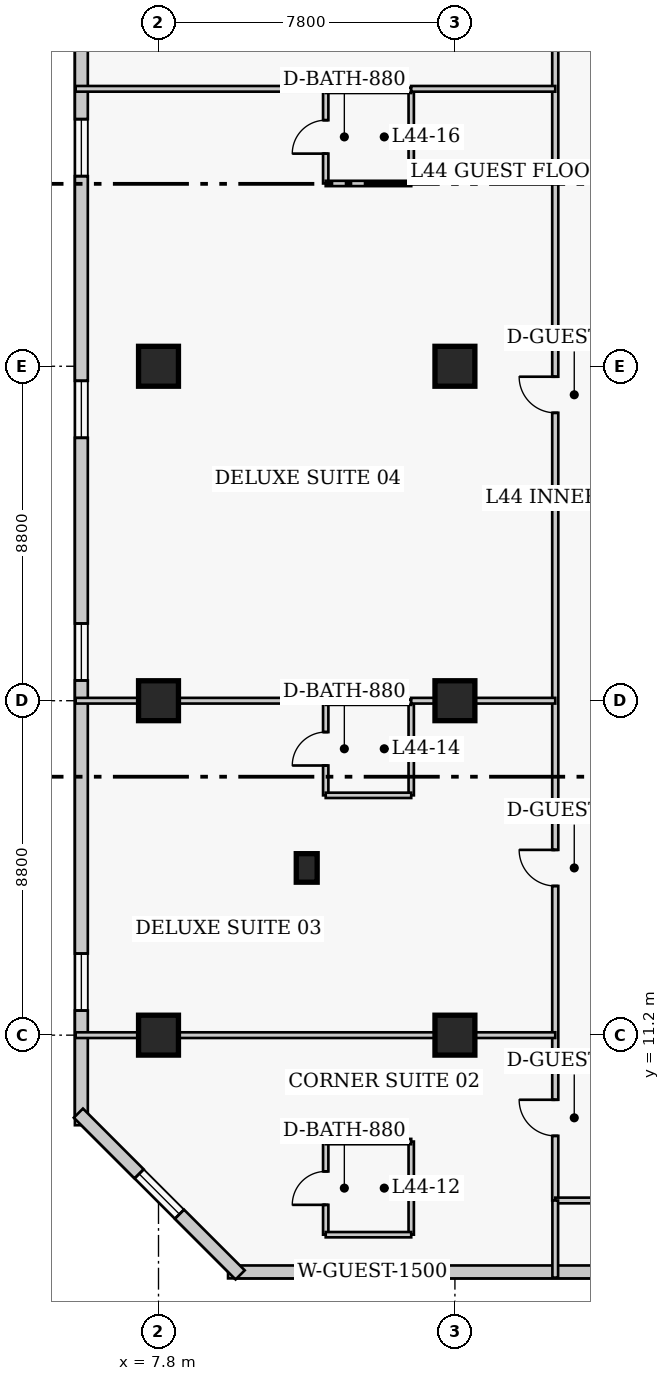
"""IFC4 building model, lengths in metres.
Left out: names, types, materials, properties, quantities, classifications, styles, units other than length and angle.
Written with IfcOpenShell. Run it as: python <this file> out.ifc"""

import sys

from ifc_helpers import new_model, si_unit, direction, frame, frame_2d, origin, origin_2d, place, context, subcontext, project, spatial, rectangle, extrude, element, fill, save


model = new_model("IFC4")
c1 = context("Model", 3, precision=1e-05, world=origin(), true_north=direction((0.0, 1.0)))
c2 = subcontext(c1, "Body", "Model", "MODEL_VIEW")
j1 = project(units=[si_unit("LENGTHUNIT", "METRE"), si_unit("PLANEANGLEUNIT", "RADIAN")], contexts=[c1])
p1 = place(None, origin())
s1 = spatial("IfcSite", under=j1, at=p1, CompositionType="ELEMENT")
p2 = place(p1, origin())
s2 = spatial("IfcBuilding", under=s1, at=p2, CompositionType="ELEMENT")
p3 = place(p2, frame((0.0, 0.0, 176.4)))
s3 = spatial("IfcBuildingStorey", under=s2, at=p3, CompositionType="ELEMENT", Elevation=176.4)
for number, where, z_axis, x_axis in (
    (1, (7.8, 11.2, 0.0), (0.0, 0.0, 1.0), (1.0, 0.0, 0.0)),
    (2, (7.8, 20.0, 0.0), (0.0, 0.0, 1.0), (1.0, 0.0, 0.0)),
    (3, (7.8, 28.8, 0.0), (0.0, 0.0, 1.0), (1.0, 0.0, 0.0)),
    (4, (15.6, 11.2, 0.0), (0.0, 0.0, 1.0), (1.0, 0.0, 0.0)),
    (5, (15.6, 20.0, 0.0), (0.0, 0.0, 1.0), (1.0, 0.0, 0.0)),
    (6, (15.6, 28.8, 0.0), (0.0, 0.0, 1.0), (1.0, 0.0, 0.0)),
):
    element("IfcColumn", number, at=place(p3, frame(where, z_axis=z_axis, x_axis=x_axis)), inside=s3, PredefinedType="COLUMN", context=c2, shape_type="SweptSolid", body=[
        extrude(rectangle(XDim=1.05, YDim=1.05, at=origin_2d()), origin(), (0.0, 0.0, 1.0), 3.8),
    ])
p4 = place(p3, frame((11.7, 15.6, 0.0), z_axis=(0.0, 0.0, 1.0), x_axis=(1.0, 0.0, 0.0)))
e7 = element("IfcColumn", 7, at=p4, inside=s3, PredefinedType="PILASTER", context=c2, shape_type="SweptSolid", body=[
    extrude(rectangle(XDim=0.55, YDim=0.75, at=origin_2d()), origin(), (0.0, 0.0, 1.0), 3.8),
])
p5 = place(p3, frame((9.63, 4.97, 0.0), z_axis=(0.0, 0.0, 1.0), x_axis=(1.0, 0.0, 0.0)))
e8 = element("IfcWall", 8, at=p5, inside=s3, PredefinedType="SOLIDWALL", context=c2, shape_type="SweptSolid", body=[
    extrude(rectangle(XDim=26.69, YDim=0.34, at=frame_2d((13.345, 0.0))), origin(), (0.0, 0.0, 1.0), 3.55),
])
p6 = place(p5, frame((3.048, 0.0, 0.85)))
e9 = element("IfcOpeningElement", 9, at=p6, cuts=e8, PredefinedType="OPENING", context=c2, shape_type="SweptSolid", body=[
    extrude(rectangle(XDim=1.5, YDim=1.75, at=frame_2d((0.75, 0.875))), frame((0.0, 0.18, 0.0), z_axis=(0.0, -1.0, 0.0), x_axis=(1.0, 0.0, 0.0)), (0.0, 0.0, 1.0), 0.36),
])
p7 = place(p5, frame((22.642, 0.0, 0.85)))
e10 = element("IfcOpeningElement", 10, at=p7, cuts=e8, PredefinedType="OPENING", context=c2, shape_type="SweptSolid", body=[
    extrude(rectangle(XDim=1.5, YDim=1.75, at=frame_2d((0.75, 0.875))), frame((0.0, 0.18, 0.0), z_axis=(0.0, -1.0, 0.0), x_axis=(1.0, 0.0, 0.0)), (0.0, 0.0, 1.0), 0.36),
])
p8 = place(p3, frame((5.77, 38.97, 0.0), z_axis=(0.0, 0.0, 1.0), x_axis=(0.0, -1.0, 0.0)))
e11 = element("IfcWall", 11, at=p8, inside=s3, PredefinedType="SOLIDWALL", context=c2, shape_type="SweptSolid", body=[
    extrude(rectangle(XDim=30.14, YDim=0.34, at=frame_2d((15.07, 0.0))), origin(), (0.0, 0.0, 1.0), 3.55),
])
p9 = place(p8, frame((3.667, 0.0, 0.85)))
e12 = element("IfcOpeningElement", 12, at=p9, cuts=e11, PredefinedType="OPENING", context=c2, shape_type="SweptSolid", body=[
    extrude(rectangle(XDim=1.5, YDim=1.75, at=frame_2d((0.75, 0.875))), frame((0.0, 0.18, 0.0), z_axis=(0.0, -1.0, 0.0), x_axis=(1.0, 0.0, 0.0)), (0.0, 0.0, 1.0), 0.36),
])
p10 = place(p8, frame((10.552, 0.0, 0.85)))
e13 = element("IfcOpeningElement", 13, at=p10, cuts=e11, PredefinedType="OPENING", context=c2, shape_type="SweptSolid", body=[
    extrude(rectangle(XDim=1.5, YDim=1.75, at=frame_2d((0.75, 0.875))), frame((0.0, 0.18, 0.0), z_axis=(0.0, -1.0, 0.0), x_axis=(1.0, 0.0, 0.0)), (0.0, 0.0, 1.0), 0.36),
])
p11 = place(p8, frame((16.938, 0.0, 0.85)))
e14 = element("IfcOpeningElement", 14, at=p11, cuts=e11, PredefinedType="OPENING", context=c2, shape_type="SweptSolid", body=[
    extrude(rectangle(XDim=1.5, YDim=1.75, at=frame_2d((0.75, 0.875))), frame((0.0, 0.18, 0.0), z_axis=(0.0, -1.0, 0.0), x_axis=(1.0, 0.0, 0.0)), (0.0, 0.0, 1.0), 0.36),
])
p12 = place(p8, frame((25.623, 0.0, 0.85)))
e15 = element("IfcOpeningElement", 15, at=p12, cuts=e11, PredefinedType="OPENING", context=c2, shape_type="SweptSolid", body=[
    extrude(rectangle(XDim=1.5, YDim=1.75, at=frame_2d((0.75, 0.875))), frame((0.0, 0.18, 0.0), z_axis=(0.0, -1.0, 0.0), x_axis=(1.0, 0.0, 0.0)), (0.0, 0.0, 1.0), 0.36),
])
p13 = place(p3, frame((5.692, 9.148, 0.0), z_axis=(0.0, 0.0, 1.0), x_axis=(0.707106781187, -0.707106781187, 0.0)))
e16 = element("IfcWall", 16, at=p13, inside=s3, PredefinedType="SOLIDWALL", context=c2, shape_type="SweptSolid", body=[
    extrude(rectangle(XDim=6.02, YDim=0.34, at=frame_2d((3.01, 0.0))), origin(), (0.0, 0.0, 1.0), 3.55),
])
p14 = place(p13, frame((2.26, 0.0, 0.85)))
e17 = element("IfcOpeningElement", 17, at=p14, cuts=e16, PredefinedType="OPENING", context=c2, shape_type="SweptSolid", body=[
    extrude(rectangle(XDim=1.5, YDim=1.75, at=frame_2d((0.75, 0.875))), frame((0.0, 0.18, 0.0), z_axis=(0.0, -1.0, 0.0), x_axis=(1.0, 0.0, 0.0)), (0.0, 0.0, 1.0), 0.36),
])
p15 = place(p3, frame((18.24, 6.85, 0.0), z_axis=(0.0, 0.0, 1.0), x_axis=(0.0, 1.0, 0.0)))
e18 = element("IfcWall", 18, at=p15, inside=s3, PredefinedType="PARTITIONING", context=c2, shape_type="SweptSolid", body=[
    extrude(rectangle(XDim=33.8, YDim=0.16, at=frame_2d((16.9, 0.0))), origin(), (0.0, 0.0, 1.0), 3.55),
])
p16 = place(p15, frame((1.7, 0.0, 0.0)))
e19 = element("IfcOpeningElement", 19, at=p16, cuts=e18, PredefinedType="OPENING", context=c2, shape_type="SweptSolid", body=[
    extrude(rectangle(XDim=0.95, YDim=2.1, at=frame_2d((0.475, 1.05))), frame((0.0, 0.09, 0.0), z_axis=(0.0, -1.0, 0.0), x_axis=(1.0, 0.0, 0.0)), (0.0, 0.0, 1.0), 0.18),
])
p17 = place(p15, frame((8.275, 0.0, 0.0)))
e20 = element("IfcOpeningElement", 20, at=p17, cuts=e18, PredefinedType="OPENING", context=c2, shape_type="SweptSolid", body=[
    extrude(rectangle(XDim=0.95, YDim=2.1, at=frame_2d((0.475, 1.05))), frame((0.0, 0.09, 0.0), z_axis=(0.0, -1.0, 0.0), x_axis=(1.0, 0.0, 0.0)), (0.0, 0.0, 1.0), 0.18),
])
p18 = place(p15, frame((20.725, 0.0, 0.0)))
e21 = element("IfcOpeningElement", 21, at=p18, cuts=e18, PredefinedType="OPENING", context=c2, shape_type="SweptSolid", body=[
    extrude(rectangle(XDim=0.95, YDim=2.1, at=frame_2d((0.475, 1.05))), frame((0.0, 0.09, 0.0), z_axis=(0.0, -1.0, 0.0), x_axis=(1.0, 0.0, 0.0)), (0.0, 0.0, 1.0), 0.18),
])
p19 = place(p15, frame((31.08, 0.0, 0.0)))
e22 = element("IfcOpeningElement", 22, at=p19, cuts=e18, PredefinedType="OPENING", context=c2, shape_type="SweptSolid", body=[
    extrude(rectangle(XDim=1.0, YDim=2.15, at=frame_2d((0.5, 1.075))), frame((0.0, 0.09, 0.0), z_axis=(0.0, -1.0, 0.0), x_axis=(1.0, 0.0, 0.0)), (0.0, 0.0, 1.0), 0.18),
])
p20 = place(p3, frame((18.24, 6.85, 0.0), z_axis=(0.0, 0.0, 1.0), x_axis=(1.0, 0.0, 0.0)))
e23 = element("IfcWall", 23, at=p20, inside=s3, PredefinedType="PARTITIONING", context=c2, shape_type="SweptSolid", body=[
    extrude(rectangle(XDim=2.22, YDim=0.15, at=frame_2d((1.11, 0.0))), origin(), (0.0, 0.0, 1.0), 3.55),
])
p21 = place(p3, frame((18.24, 4.82, 0.0), z_axis=(0.0, 0.0, 1.0), x_axis=(0.0, 1.0, 0.0)))
e24 = element("IfcWall", 24, at=p21, inside=s3, PredefinedType="PARTITIONING", context=c2, shape_type="SweptSolid", body=[
    extrude(rectangle(XDim=2.03, YDim=0.15, at=frame_2d((1.015, 0.0))), origin(), (0.0, 0.0, 1.0), 3.55),
])
p22 = place(p3, frame((12.2, 5.95, 0.0), z_axis=(0.0, 0.0, 1.0), x_axis=(0.0, 1.0, 0.0)))
e25 = element("IfcWall", 25, at=p22, inside=s3, PredefinedType="PLUMBINGWALL", context=c2, shape_type="SweptSolid", body=[
    extrude(rectangle(XDim=2.45, YDim=0.14, at=frame_2d((1.225, 0.0))), origin(), (0.0, 0.0, 1.0), 3.55),
])
p23 = place(p22, frame((0.785, 0.0, 0.0)))
e26 = element("IfcOpeningElement", 26, at=p23, cuts=e25, PredefinedType="OPENING", context=c2, shape_type="SweptSolid", body=[
    extrude(rectangle(XDim=0.88, YDim=2.05, at=frame_2d((0.44, 1.025))), frame((0.0, 0.08, 0.0), z_axis=(0.0, -1.0, 0.0), x_axis=(1.0, 0.0, 0.0)), (0.0, 0.0, 1.0), 0.16),
])
p24 = place(p3, frame((14.45, 5.95, 0.0), z_axis=(0.0, 0.0, 1.0), x_axis=(0.0, 1.0, 0.0)))
e27 = element("IfcWall", 27, at=p24, inside=s3, PredefinedType="PLUMBINGWALL", context=c2, shape_type="SweptSolid", body=[
    extrude(rectangle(XDim=2.45, YDim=0.14, at=frame_2d((1.225, 0.0))), origin(), (0.0, 0.0, 1.0), 3.55),
])
for number, where, z_axis, x_axis in (
    (28, (12.2, 5.95, 0.0), (0.0, 0.0, 1.0), (1.0, 0.0, 0.0)),
    (29, (12.2, 8.4, 0.0), (0.0, 0.0, 1.0), (1.0, 0.0, 0.0)),
):
    element("IfcWall", number, at=place(p3, frame(where, z_axis=z_axis, x_axis=x_axis)), inside=s3, PredefinedType="PLUMBINGWALL", context=c2, shape_type="SweptSolid", body=[
        extrude(rectangle(XDim=2.25, YDim=0.14, at=frame_2d((1.125, 0.0))), origin(), (0.0, 0.0, 1.0), 3.55),
    ])
p25 = place(p3, frame((5.62, 11.2, 0.0), z_axis=(0.0, 0.0, 1.0), x_axis=(1.0, 0.0, 0.0)))
e30 = element("IfcWall", 30, at=p25, inside=s3, PredefinedType="PARTITIONING", context=c2, shape_type="SweptSolid", body=[
    extrude(rectangle(XDim=12.62, YDim=0.15, at=frame_2d((6.31, 0.0))), origin(), (0.0, 0.0, 1.0), 2.778),
])
p26 = place(p3, frame((12.2, 17.51, 0.0), z_axis=(0.0, 0.0, 1.0), x_axis=(0.0, 1.0, 0.0)))
e31 = element("IfcWall", 31, at=p26, inside=s3, PredefinedType="PLUMBINGWALL", context=c2, shape_type="SweptSolid", body=[
    extrude(rectangle(XDim=2.45, YDim=0.14, at=frame_2d((1.225, 0.0))), origin(), (0.0, 0.0, 1.0), 3.55),
])
p27 = place(p26, frame((0.785, 0.0, 0.0)))
e32 = element("IfcOpeningElement", 32, at=p27, cuts=e31, PredefinedType="OPENING", context=c2, shape_type="SweptSolid", body=[
    extrude(rectangle(XDim=0.88, YDim=2.05, at=frame_2d((0.44, 1.025))), frame((0.0, 0.08, 0.0), z_axis=(0.0, -1.0, 0.0), x_axis=(1.0, 0.0, 0.0)), (0.0, 0.0, 1.0), 0.16),
])
p28 = place(p3, frame((14.45, 17.51, 0.0), z_axis=(0.0, 0.0, 1.0), x_axis=(0.0, 1.0, 0.0)))
e33 = element("IfcWall", 33, at=p28, inside=s3, PredefinedType="PLUMBINGWALL", context=c2, shape_type="SweptSolid", body=[
    extrude(rectangle(XDim=2.45, YDim=0.14, at=frame_2d((1.225, 0.0))), origin(), (0.0, 0.0, 1.0), 3.55),
])
p29 = place(p3, frame((12.2, 17.51, 0.0), z_axis=(0.0, 0.0, 1.0), x_axis=(1.0, 0.0, 0.0)))
e34 = element("IfcWall", 34, at=p29, inside=s3, PredefinedType="PLUMBINGWALL", context=c2, shape_type="SweptSolid", body=[
    extrude(rectangle(XDim=2.25, YDim=0.14, at=frame_2d((1.125, 0.0))), origin(), (0.0, 0.0, 1.0), 3.55),
])
p30 = place(p3, frame((12.2, 19.96, 0.0), z_axis=(0.0, 0.0, 1.0), x_axis=(1.0, 0.0, 0.0)))
e35 = element("IfcWall", 35, at=p30, inside=s3, PredefinedType="PLUMBINGWALL", context=c2, shape_type="SweptSolid", body=[
    extrude(rectangle(XDim=2.25, YDim=0.14, at=frame_2d((1.125, 0.0))), origin(), (0.0, 0.0, 1.0), 2.9),
])
p31 = place(p3, frame((5.62, 20.0, 0.0), z_axis=(0.0, 0.0, 1.0), x_axis=(1.0, 0.0, 0.0)))
e36 = element("IfcWall", 36, at=p31, inside=s3, PredefinedType="PARTITIONING", context=c2, shape_type="SweptSolid", body=[
    extrude(rectangle(XDim=6.58, YDim=0.15, at=frame_2d((3.29, 0.0))), origin(), (0.0, 0.0, 1.0), 2.778),
])
p32 = place(p3, frame((14.45, 20.0, 0.0), z_axis=(0.0, 0.0, 1.0), x_axis=(1.0, 0.0, 0.0)))
e37 = element("IfcWall", 37, at=p32, inside=s3, PredefinedType="PARTITIONING", context=c2, shape_type="SweptSolid", body=[
    extrude(rectangle(XDim=3.79, YDim=0.15, at=frame_2d((1.895, 0.0))), origin(), (0.0, 0.0, 1.0), 2.778),
])
p33 = place(p3, frame((12.2, 33.61, 0.0), z_axis=(0.0, 0.0, 1.0), x_axis=(0.0, 1.0, 0.0)))
e38 = element("IfcWall", 38, at=p33, inside=s3, PredefinedType="PLUMBINGWALL", context=c2, shape_type="SweptSolid", body=[
    extrude(rectangle(XDim=2.45, YDim=0.14, at=frame_2d((1.225, 0.0))), origin(), (0.0, 0.0, 1.0), 3.55),
])
p34 = place(p33, frame((0.785, 0.0, 0.0)))
e39 = element("IfcOpeningElement", 39, at=p34, cuts=e38, PredefinedType="OPENING", context=c2, shape_type="SweptSolid", body=[
    extrude(rectangle(XDim=0.88, YDim=2.05, at=frame_2d((0.44, 1.025))), frame((0.0, 0.08, 0.0), z_axis=(0.0, -1.0, 0.0), x_axis=(1.0, 0.0, 0.0)), (0.0, 0.0, 1.0), 0.16),
])
p35 = place(p3, frame((14.45, 33.61, 0.0), z_axis=(0.0, 0.0, 1.0), x_axis=(0.0, 1.0, 0.0)))
e40 = element("IfcWall", 40, at=p35, inside=s3, PredefinedType="PLUMBINGWALL", context=c2, shape_type="SweptSolid", body=[
    extrude(rectangle(XDim=2.45, YDim=0.14, at=frame_2d((1.225, 0.0))), origin(), (0.0, 0.0, 1.0), 3.55),
])
for number, where, z_axis, x_axis in (
    (41, (12.2, 33.61, 0.0), (0.0, 0.0, 1.0), (1.0, 0.0, 0.0)),
    (42, (12.2, 36.06, 0.0), (0.0, 0.0, 1.0), (1.0, 0.0, 0.0)),
):
    element("IfcWall", number, at=place(p3, frame(where, z_axis=z_axis, x_axis=x_axis)), inside=s3, PredefinedType="PLUMBINGWALL", context=c2, shape_type="SweptSolid", body=[
        extrude(rectangle(XDim=2.25, YDim=0.14, at=frame_2d((1.125, 0.0))), origin(), (0.0, 0.0, 1.0), 3.55),
    ])
p36 = place(p3, frame((5.62, 36.1, 0.0), z_axis=(0.0, 0.0, 1.0), x_axis=(1.0, 0.0, 0.0)))
e43 = element("IfcWall", 43, at=p36, inside=s3, PredefinedType="PARTITIONING", context=c2, shape_type="SweptSolid", body=[
    extrude(rectangle(XDim=6.58, YDim=0.15, at=frame_2d((3.29, 0.0))), origin(), (0.0, 0.0, 1.0), 3.55),
])
p37 = place(p3, frame((14.45, 36.1, 0.0), z_axis=(0.0, 0.0, 1.0), x_axis=(1.0, 0.0, 0.0)))
e44 = element("IfcWall", 44, at=p37, inside=s3, PredefinedType="PARTITIONING", context=c2, shape_type="SweptSolid", body=[
    extrude(rectangle(XDim=3.79, YDim=0.15, at=frame_2d((1.895, 0.0))), origin(), (0.0, 0.0, 1.0), 3.55),
])
p38 = place(p6, origin())
e45 = element("IfcWindow", 45, at=p38, inside=s3, PartitioningType="SINGLE_PANEL", PredefinedType="WINDOW", context=c2, shape_type="SweptSolid", body=[
    extrude(rectangle(XDim=1.5, YDim=1.75, at=frame_2d((0.75, 0.875))), frame((0.0, 0.03, 0.0), z_axis=(0.0, -1.0, 0.0), x_axis=(1.0, 0.0, 0.0)), (0.0, 0.0, 1.0), 0.06),
])
fill(e9, e45)
p39 = place(p9, origin())
e46 = element("IfcWindow", 46, at=p39, inside=s3, PartitioningType="SINGLE_PANEL", PredefinedType="WINDOW", context=c2, shape_type="SweptSolid", body=[
    extrude(rectangle(XDim=1.5, YDim=1.75, at=frame_2d((0.75, 0.875))), frame((0.0, 0.03, 0.0), z_axis=(0.0, -1.0, 0.0), x_axis=(1.0, 0.0, 0.0)), (0.0, 0.0, 1.0), 0.06),
])
fill(e12, e46)
p40 = place(p10, origin())
e47 = element("IfcWindow", 47, at=p40, inside=s3, PartitioningType="SINGLE_PANEL", PredefinedType="WINDOW", context=c2, shape_type="SweptSolid", body=[
    extrude(rectangle(XDim=1.5, YDim=1.75, at=frame_2d((0.75, 0.875))), frame((0.0, 0.03, 0.0), z_axis=(0.0, -1.0, 0.0), x_axis=(1.0, 0.0, 0.0)), (0.0, 0.0, 1.0), 0.06),
])
fill(e13, e47)
p41 = place(p11, origin())
e48 = element("IfcWindow", 48, at=p41, inside=s3, PartitioningType="SINGLE_PANEL", PredefinedType="WINDOW", context=c2, shape_type="SweptSolid", body=[
    extrude(rectangle(XDim=1.5, YDim=1.75, at=frame_2d((0.75, 0.875))), frame((0.0, 0.03, 0.0), z_axis=(0.0, -1.0, 0.0), x_axis=(1.0, 0.0, 0.0)), (0.0, 0.0, 1.0), 0.06),
])
fill(e14, e48)
p42 = place(p12, origin())
e49 = element("IfcWindow", 49, at=p42, inside=s3, PartitioningType="SINGLE_PANEL", PredefinedType="WINDOW", context=c2, shape_type="SweptSolid", body=[
    extrude(rectangle(XDim=1.5, YDim=1.75, at=frame_2d((0.75, 0.875))), frame((0.0, 0.03, 0.0), z_axis=(0.0, -1.0, 0.0), x_axis=(1.0, 0.0, 0.0)), (0.0, 0.0, 1.0), 0.06),
])
fill(e15, e49)
p43 = place(p14, origin())
e50 = element("IfcWindow", 50, at=p43, inside=s3, PartitioningType="SINGLE_PANEL", PredefinedType="WINDOW", context=c2, shape_type="SweptSolid", body=[
    extrude(rectangle(XDim=1.5, YDim=1.75, at=frame_2d((0.75, 0.875))), frame((0.0, 0.03, 0.0), z_axis=(0.0, -1.0, 0.0), x_axis=(1.0, 0.0, 0.0)), (0.0, 0.0, 1.0), 0.06),
])
fill(e17, e50)
p44 = place(p23, origin())
e51 = element("IfcDoor", 51, at=p44, inside=s3, OperationType="SINGLE_SWING_LEFT", PredefinedType="DOOR", context=c2, shape_type="SweptSolid", body=[
    extrude(rectangle(XDim=0.88, YDim=2.05, at=frame_2d((0.44, 1.025))), frame((0.0, 0.025, 0.0), z_axis=(0.0, -1.0, 0.0), x_axis=(1.0, 0.0, 0.0)), (0.0, 0.0, 1.0), 0.05),
])
fill(e26, e51)
p45 = place(p16, origin())
e52 = element("IfcDoor", 52, at=p45, inside=s3, OperationType="SINGLE_SWING_RIGHT", PredefinedType="DOOR", context=c2, shape_type="SweptSolid", body=[
    extrude(rectangle(XDim=0.95, YDim=2.1, at=frame_2d((0.475, 1.05))), frame((0.0, 0.025, 0.0), z_axis=(0.0, -1.0, 0.0), x_axis=(1.0, 0.0, 0.0)), (0.0, 0.0, 1.0), 0.05),
])
fill(e19, e52)
p46 = place(p27, origin())
e53 = element("IfcDoor", 53, at=p46, inside=s3, OperationType="SINGLE_SWING_LEFT", PredefinedType="DOOR", context=c2, shape_type="SweptSolid", body=[
    extrude(rectangle(XDim=0.88, YDim=2.05, at=frame_2d((0.44, 1.025))), frame((0.0, 0.025, 0.0), z_axis=(0.0, -1.0, 0.0), x_axis=(1.0, 0.0, 0.0)), (0.0, 0.0, 1.0), 0.05),
])
fill(e32, e53)
p47 = place(p17, origin())
e54 = element("IfcDoor", 54, at=p47, inside=s3, OperationType="SINGLE_SWING_RIGHT", PredefinedType="DOOR", context=c2, shape_type="SweptSolid", body=[
    extrude(rectangle(XDim=0.95, YDim=2.1, at=frame_2d((0.475, 1.05))), frame((0.0, 0.025, 0.0), z_axis=(0.0, -1.0, 0.0), x_axis=(1.0, 0.0, 0.0)), (0.0, 0.0, 1.0), 0.05),
])
fill(e20, e54)
p48 = place(p34, origin())
e55 = element("IfcDoor", 55, at=p48, inside=s3, OperationType="SINGLE_SWING_LEFT", PredefinedType="DOOR", context=c2, shape_type="SweptSolid", body=[
    extrude(rectangle(XDim=0.88, YDim=2.05, at=frame_2d((0.44, 1.025))), frame((0.0, 0.025, 0.0), z_axis=(0.0, -1.0, 0.0), x_axis=(1.0, 0.0, 0.0)), (0.0, 0.0, 1.0), 0.05),
])
fill(e39, e55)
p49 = place(p18, origin())
e56 = element("IfcDoor", 56, at=p49, inside=s3, OperationType="SINGLE_SWING_RIGHT", PredefinedType="DOOR", context=c2, shape_type="SweptSolid", body=[
    extrude(rectangle(XDim=0.95, YDim=2.1, at=frame_2d((0.475, 1.05))), frame((0.0, 0.025, 0.0), z_axis=(0.0, -1.0, 0.0), x_axis=(1.0, 0.0, 0.0)), (0.0, 0.0, 1.0), 0.05),
])
fill(e21, e56)
save(model, sys.argv[1])
